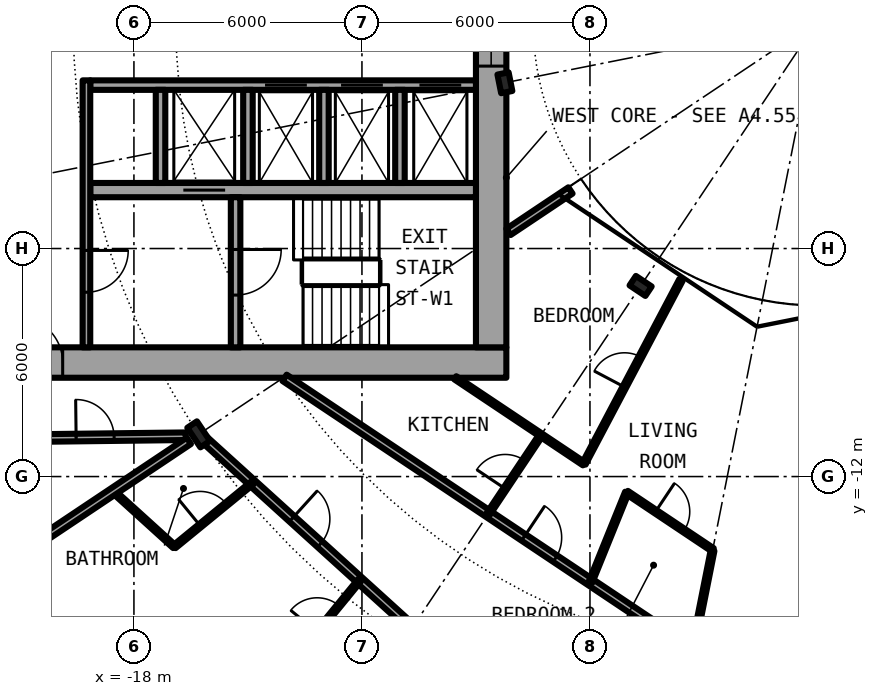
"""IFC4 building model, lengths in metres.
Left out: names, types, materials, properties, quantities, classifications, styles, units other than length and angle.
Written with IfcOpenShell. Run it as: python <this file> out.ifc"""

import sys

from ifc_helpers import new_model, si_unit, direction, frame, frame_2d, origin, origin_2d, place, context, subcontext, project, spatial, rectangle, i_section, extrude, element, fill, save


model = new_model("IFC4")
c1 = context("Model", 3, precision=1e-05, world=origin(), true_north=direction((0.0, 1.0)))
c2 = subcontext(c1, "Body", "Model", "MODEL_VIEW")
j1 = project(units=[si_unit("LENGTHUNIT", "METRE"), si_unit("PLANEANGLEUNIT", "RADIAN")], contexts=[c1])
p1 = place(None, origin())
s1 = spatial("IfcSite", under=j1, at=p1, CompositionType="ELEMENT")
p2 = place(p1, origin())
s2 = spatial("IfcBuilding", under=s1, at=p2, CompositionType="ELEMENT")
p3 = place(p2, frame((0.0, 0.0, 31.95)))
s3 = spatial("IfcBuildingStorey", under=s2, at=p3, CompositionType="ELEMENT", Elevation=31.95)
p4 = place(p3, frame((-16.297, -10.889, 0.0), z_axis=(0.0, 0.0, 1.0), x_axis=(-0.831469612303, -0.55557023302, 0.0)))
e1 = element("IfcColumn", 1, at=p4, inside=s3, PredefinedType="COLUMN", context=c2, shape_type="SweptSolid", body=[
    extrude(i_section(OverallWidth=0.305, OverallDepth=0.62, WebThickness=0.021, FlangeThickness=0.04, FilletRadius=0.027, at=origin_2d()), origin(), (0.0, 0.0, 1.0), 3.05),
])
for number, where, z_axis, x_axis in (
    (2, (-8.239, -1.639, 0.0), (0.0, 0.0, 1.0), (-0.981, -0.195, 0.0)),
    (3, (-4.667, -6.984, 0.0), (0.0, 0.0, 1.0), (-0.556, -0.831, 0.0)),
):
    element("IfcColumn", number, at=place(p3, frame(where, z_axis=z_axis, x_axis=x_axis)), inside=s3, PredefinedType="COLUMN", context=c2, shape_type="SweptSolid", body=[
        extrude(i_section(OverallWidth=0.3, OverallDepth=0.5, WebThickness=0.014, FlangeThickness=0.028, FilletRadius=0.027, at=origin_2d()), origin(), (0.0, 0.0, 1.0), 3.05),
    ])
p5 = place(p3, frame((-22.699, -15.167, 0.0), z_axis=(0.0, 0.0, 1.0), x_axis=(0.634382322723, -0.773019449054, 0.0)))
e4 = element("IfcWall", 4, at=p5, inside=s3, PredefinedType="SOLIDWALL", context=c2, shape_type="SweptSolid", body=[
    extrude(rectangle(XDim=5.352, YDim=0.25, at=frame_2d((2.676, 0.0))), origin(), (0.0, 0.0, 1.0), 2.7),
])
p6 = place(p5, frame((0.841, 0.0, 0.0)))
e5 = element("IfcOpeningElement", 5, at=p6, cuts=e4, PredefinedType="OPENING", context=c2, shape_type="SweptSolid", body=[
    extrude(rectangle(XDim=1.0, YDim=2.2, at=frame_2d((0.5, 1.1))), frame((0.0, 0.135, 0.0), z_axis=(0.0, -1.0, 0.0), x_axis=(1.0, 0.0, 0.0)), (0.0, 0.0, 1.0), 0.27),
])
p7 = place(p5, frame((3.111, 0.0, 0.3)))
e6 = element("IfcOpeningElement", 6, at=p7, cuts=e4, PredefinedType="OPENING", context=c2, shape_type="SweptSolid", body=[
    extrude(rectangle(XDim=1.8, YDim=2.1, at=frame_2d((0.9, 1.05))), frame((0.0, 0.135, 0.0), z_axis=(0.0, -1.0, 0.0), x_axis=(1.0, 0.0, 0.0)), (0.0, 0.0, 1.0), 0.27),
])
p8 = place(p3, frame((-22.4, -9.0, 0.0), z_axis=(0.0, 0.0, 1.0), x_axis=(1.0, 0.0, 0.0)))
e7 = element("IfcWall", 7, at=p8, inside=s3, PredefinedType="SHEAR", context=c2, shape_type="SweptSolid", body=[
    extrude(rectangle(XDim=14.2, YDim=0.8, at=frame_2d((7.1, 0.0))), origin(), (0.0, 0.0, 1.0), 3.05),
])
p9 = place(p8, frame((1.325, 0.0, 0.0)))
e8 = element("IfcOpeningElement", 8, at=p9, cuts=e7, PredefinedType="OPENING", context=c2, shape_type="SweptSolid", body=[
    extrude(rectangle(XDim=1.2, YDim=2.3, at=frame_2d((0.6, 1.15))), frame((0.0, 0.41, 0.0), z_axis=(0.0, -1.0, 0.0), x_axis=(1.0, 0.0, 0.0)), (0.0, 0.0, 1.0), 0.82),
])
p10 = place(p3, frame((-8.6, 8.6, 0.0), z_axis=(0.0, 0.0, 1.0), x_axis=(0.0, -1.0, 0.0)))
e9 = element("IfcWall", 9, at=p10, inside=s3, PredefinedType="SHEAR", context=c2, shape_type="SweptSolid", body=[
    extrude(rectangle(XDim=17.2, YDim=0.8, at=frame_2d((8.6, 0.0))), origin(), (0.0, 0.0, 1.0), 3.05),
])
p11 = place(p10, frame((7.4, 0.0, 0.1)))
e10 = element("IfcOpeningElement", 10, at=p11, cuts=e9, PredefinedType="OPENING", context=c2, shape_type="SweptSolid", body=[
    extrude(rectangle(XDim=2.4, YDim=2.2, at=frame_2d((1.2, 1.1))), frame((0.0, 0.41, 0.0), z_axis=(0.0, -1.0, 0.0), x_axis=(1.0, 0.0, 0.0)), (0.0, 0.0, 1.0), 0.82),
])
p12 = place(p3, frame((-9.0, -1.7, 0.0), z_axis=(0.0, 0.0, 1.0), x_axis=(-1.0, 0.0, 0.0)))
e11 = element("IfcWall", 11, at=p12, inside=s3, PredefinedType="SHEAR", context=c2, shape_type="SweptSolid", body=[
    extrude(rectangle(XDim=10.15, YDim=0.25, at=frame_2d((5.075, 0.0))), origin(), (0.0, 0.0, 1.0), 3.05),
])
p13 = place(p12, frame((0.387, 0.0, 0.0)))
e12 = element("IfcOpeningElement", 12, at=p13, cuts=e11, PredefinedType="OPENING", context=c2, shape_type="SweptSolid", body=[
    extrude(rectangle(XDim=1.1, YDim=2.3, at=frame_2d((0.55, 1.15))), frame((0.0, 0.135, 0.0), z_axis=(0.0, -1.0, 0.0), x_axis=(1.0, 0.0, 0.0)), (0.0, 0.0, 1.0), 0.27),
])
p14 = place(p12, frame((2.45, 0.0, 0.0)))
e13 = element("IfcOpeningElement", 13, at=p14, cuts=e11, PredefinedType="OPENING", context=c2, shape_type="SweptSolid", body=[
    extrude(rectangle(XDim=1.1, YDim=2.3, at=frame_2d((0.55, 1.15))), frame((0.0, 0.135, 0.0), z_axis=(0.0, -1.0, 0.0), x_axis=(1.0, 0.0, 0.0)), (0.0, 0.0, 1.0), 0.27),
])
p15 = place(p12, frame((4.45, 0.0, 0.0)))
e14 = element("IfcOpeningElement", 14, at=p15, cuts=e11, PredefinedType="OPENING", context=c2, shape_type="SweptSolid", body=[
    extrude(rectangle(XDim=1.1, YDim=2.3, at=frame_2d((0.55, 1.15))), frame((0.0, 0.135, 0.0), z_axis=(0.0, -1.0, 0.0), x_axis=(1.0, 0.0, 0.0)), (0.0, 0.0, 1.0), 0.27),
])
p16 = place(p3, frame((-9.0, -4.462, 0.0), z_axis=(0.0, 0.0, 1.0), x_axis=(-1.0, 0.0, 0.0)))
e15 = element("IfcWall", 15, at=p16, inside=s3, PredefinedType="SHEAR", context=c2, shape_type="SweptSolid", body=[
    extrude(rectangle(XDim=10.15, YDim=0.375, at=frame_2d((5.075, 0.0))), origin(), (0.0, 0.0, 1.0), 3.05),
])
p17 = place(p16, frame((6.6, 0.0, 0.0)))
e16 = element("IfcOpeningElement", 16, at=p17, cuts=e15, PredefinedType="OPENING", context=c2, shape_type="SweptSolid", body=[
    extrude(rectangle(XDim=1.1, YDim=2.3, at=frame_2d((0.55, 1.15))), frame((0.0, 0.198, 0.0), z_axis=(0.0, -1.0, 0.0), x_axis=(1.0, 0.0, 0.0)), (0.0, 0.0, 1.0), 0.395),
])
p18 = place(p3, frame((-15.325, -4.65, 0.0), z_axis=(0.0, 0.0, 1.0), x_axis=(0.0, -1.0, 0.0)))
e17 = element("IfcWall", 17, at=p18, inside=s3, PredefinedType="SHEAR", context=c2, shape_type="SweptSolid", body=[
    extrude(rectangle(XDim=3.95, YDim=0.25, at=frame_2d((1.975, 0.0))), origin(), (0.0, 0.0, 1.0), 3.05),
])
p19 = place(p18, frame((1.375, 0.0, 0.0)))
e18 = element("IfcOpeningElement", 18, at=p19, cuts=e17, PredefinedType="OPENING", context=c2, shape_type="SweptSolid", body=[
    extrude(rectangle(XDim=1.2, YDim=2.3, at=frame_2d((0.6, 1.15))), frame((0.0, 0.135, 0.0), z_axis=(0.0, -1.0, 0.0), x_axis=(1.0, 0.0, 0.0)), (0.0, 0.0, 1.0), 0.27),
])
for number, where, z_axis, x_axis in (
    (19, (-15.0, -1.825, 0.0), (0.0, 0.0, 1.0), (0.0, -1.0, 0.0)),
    (20, (-17.3, -1.825, 0.0), (0.0, 0.0, 1.0), (0.0, -1.0, 0.0)),
):
    element("IfcWall", number, at=place(p3, frame(where, z_axis=z_axis, x_axis=x_axis)), inside=s3, PredefinedType="SOLIDWALL", context=c2, shape_type="SweptSolid", body=[
        extrude(rectangle(XDim=2.45, YDim=0.25, at=frame_2d((1.225, 0.0))), origin(), (0.0, 0.0, 1.0), 2.7),
    ])
p20 = place(p3, frame((-19.25, -1.575, 0.0), z_axis=(0.0, 0.0, 1.0), x_axis=(0.0, -1.0, 0.0)))
e21 = element("IfcWall", 21, at=p20, inside=s3, PredefinedType="SOLIDWALL", context=c2, shape_type="SweptSolid", body=[
    extrude(rectangle(XDim=7.025, YDim=0.2, at=frame_2d((3.513, 0.0))), origin(), (0.0, 0.0, 1.0), 2.7),
])
p21 = place(p20, frame((4.475, 0.0, 0.0)))
e22 = element("IfcOpeningElement", 22, at=p21, cuts=e21, PredefinedType="OPENING", context=c2, shape_type="SweptSolid", body=[
    extrude(rectangle(XDim=1.1, YDim=2.3, at=frame_2d((0.55, 1.15))), frame((0.0, 0.11, 0.0), z_axis=(0.0, -1.0, 0.0), x_axis=(1.0, 0.0, 0.0)), (0.0, 0.0, 1.0), 0.22),
])
for number, where, z_axis, x_axis in (
    (23, (-11.0, -1.825, 0.0), (0.0, 0.0, 1.0), (0.0, -1.0, 0.0)),
    (24, (-13.0, -1.825, 0.0), (0.0, 0.0, 1.0), (0.0, -1.0, 0.0)),
):
    element("IfcWall", number, at=place(p3, frame(where, z_axis=z_axis, x_axis=x_axis)), inside=s3, PredefinedType="SOLIDWALL", context=c2, shape_type="SweptSolid", body=[
        extrude(rectangle(XDim=2.45, YDim=0.25, at=frame_2d((1.225, 0.0))), origin(), (0.0, 0.0, 1.0), 2.7),
    ])
p22 = place(p3, frame((-18.542, -12.389, 0.0), z_axis=(0.0, 0.0, 1.0), x_axis=(0.740836325503, -0.671685595212, 0.0)))
e25 = element("IfcWall", 25, at=p22, inside=s3, PredefinedType="PARTITIONING", context=c2, shape_type="SweptSolid", body=[
    extrude(rectangle(XDim=2.168, YDim=0.1, at=frame_2d((1.084, 0.0))), origin(), (0.0, 0.0, 1.0), 2.7),
])
p23 = place(p3, frame((-16.18, -10.994, 0.0), z_axis=(0.0, 0.0, 1.0), x_axis=(0.74089212117, -0.671624050186, 0.0)))
e26 = element("IfcWall", 26, at=p23, inside=s3, PredefinedType="PARTITIONING", context=c2, shape_type="SweptSolid", body=[
    extrude(rectangle(XDim=9.368, YDim=0.2, at=frame_2d((4.684, 0.0))), origin(), (0.0, 0.0, 1.0), 2.38),
])
p24 = place(p23, frame((3.153, 0.0, 0.0)))
e27 = element("IfcOpeningElement", 27, at=p24, cuts=e26, PredefinedType="OPENING", context=c2, shape_type="SweptSolid", body=[
    extrude(rectangle(XDim=1.0, YDim=2.3, at=frame_2d((0.5, 1.15))), frame((0.0, 0.11, 0.0), z_axis=(0.0, -1.0, 0.0), x_axis=(1.0, 0.0, 0.0)), (0.0, 0.0, 1.0), 0.22),
])
p25 = place(p3, frame((-14.036, -9.402, 0.0), z_axis=(0.0, 0.0, 1.0), x_axis=(0.831561346449, -0.555432918625, 0.0)))
e28 = element("IfcWall", 28, at=p25, inside=s3, PredefinedType="PARTITIONING", context=c2, shape_type="SweptSolid", body=[
    extrude(rectangle(XDim=12.914, YDim=0.2, at=frame_2d((6.457, 0.0))), origin(), (0.0, 0.0, 1.0), 2.7),
])
p26 = place(p25, frame((7.566, 0.0, 0.0)))
e29 = element("IfcOpeningElement", 29, at=p26, cuts=e28, PredefinedType="OPENING", context=c2, shape_type="SweptSolid", body=[
    extrude(rectangle(XDim=1.0, YDim=2.3, at=frame_2d((0.5, 1.15))), frame((0.0, 0.11, 0.0), z_axis=(0.0, -1.0, 0.0), x_axis=(1.0, 0.0, 0.0)), (0.0, 0.0, 1.0), 0.22),
])
p27 = place(p3, frame((-9.545, -9.401, 0.0), z_axis=(0.0, 0.0, 1.0), x_axis=(0.831459707426, -0.555585056429, 0.0)))
e30 = element("IfcWall", 30, at=p27, inside=s3, PredefinedType="PARTITIONING", context=c2, shape_type="SweptSolid", body=[
    extrude(rectangle(XDim=4.073, YDim=0.1, at=frame_2d((2.037, 0.0))), origin(), (0.0, 0.0, 1.0), 2.7),
])
p28 = place(p3, frame((-5.029, -12.418, 0.0), z_axis=(0.0, 0.0, 1.0), x_axis=(0.831538390496, -0.555467285384, 0.0)))
e31 = element("IfcWall", 31, at=p28, inside=s3, PredefinedType="PARTITIONING", context=c2, shape_type="SweptSolid", body=[
    extrude(rectangle(XDim=2.717, YDim=0.1, at=frame_2d((1.358, 0.0))), origin(), (0.0, 0.0, 1.0), 2.7),
])
p29 = place(p28, frame((0.908, 0.0, 0.0)))
e32 = element("IfcOpeningElement", 32, at=p29, cuts=e31, PredefinedType="OPENING", context=c2, shape_type="SweptSolid", body=[
    extrude(rectangle(XDim=0.9, YDim=2.3, at=frame_2d((0.45, 1.15))), frame((0.0, 0.06, 0.0), z_axis=(0.0, -1.0, 0.0), x_axis=(1.0, 0.0, 0.0)), (0.0, 0.0, 1.0), 0.12),
])
p30 = place(p3, frame((-21.675, -11.0, 0.0), z_axis=(0.0, 0.0, 1.0), x_axis=(0.999926652916, 0.012111514691, 0.0)))
e33 = element("IfcWall", 33, at=p30, inside=s3, PredefinedType="PARTITIONING", context=c2, shape_type="SweptSolid", body=[
    extrude(rectangle(XDim=5.04, YDim=0.2, at=frame_2d((2.52, 0.0))), origin(), (0.0, 0.0, 1.0), 2.7),
])
p31 = place(p30, frame((2.154, 0.0, 0.0)))
e34 = element("IfcOpeningElement", 34, at=p31, cuts=e33, PredefinedType="OPENING", context=c2, shape_type="SweptSolid", body=[
    extrude(rectangle(XDim=1.0, YDim=2.3, at=frame_2d((0.5, 1.15))), frame((0.0, 0.11, 0.0), z_axis=(0.0, -1.0, 0.0), x_axis=(1.0, 0.0, 0.0)), (0.0, 0.0, 1.0), 0.22),
])
p32 = place(p3, frame((-6.513, -4.472, 0.0), z_axis=(0.0, 0.0, 1.0), x_axis=(-0.831417956244, -0.555647533996, 0.0)))
e35 = element("IfcWall", 35, at=p32, inside=s3, PredefinedType="PARTITIONING", context=c2, shape_type="SweptSolid", body=[
    extrude(rectangle(XDim=1.962, YDim=0.2, at=frame_2d((0.981, 0.0))), origin(), (0.0, 0.0, 1.0), 2.7),
])
p33 = place(p3, frame((-22.595, -15.097, 0.0), z_axis=(0.0, 0.0, 1.0), x_axis=(0.831465568067, 0.555576285599, 0.0)))
e36 = element("IfcWall", 36, at=p33, inside=s3, PredefinedType="PARTITIONING", context=c2, shape_type="SweptSolid", body=[
    extrude(rectangle(XDim=7.264, YDim=0.2, at=frame_2d((3.632, 0.0))), origin(), (0.0, 0.0, 1.0), 2.7),
])
p34 = place(p3, frame((-17.219, -21.023, 0.0), z_axis=(0.0, 0.0, 1.0), x_axis=(0.633664062855, 0.773608334654, 0.0)))
e37 = element("IfcWall", 37, at=p34, inside=s3, PredefinedType="PARTITIONING", context=c2, shape_type="SweptSolid", body=[
    extrude(rectangle(XDim=8.138, YDim=0.1, at=frame_2d((4.069, 0.0))), origin(), (0.0, 0.0, 1.0), 2.7),
])
p35 = place(p34, frame((6.377, 0.0, 0.0)))
e38 = element("IfcOpeningElement", 38, at=p35, cuts=e37, PredefinedType="OPENING", context=c2, shape_type="SweptSolid", body=[
    extrude(rectangle(XDim=0.9, YDim=2.3, at=frame_2d((0.45, 1.15))), frame((0.0, 0.06, 0.0), z_axis=(0.0, -1.0, 0.0), x_axis=(1.0, 0.0, 0.0)), (0.0, 0.0, 1.0), 0.12),
])
p36 = place(p34, frame((2.308, 0.0, 0.0)))
e39 = element("IfcOpeningElement", 39, at=p36, cuts=e37, PredefinedType="OPENING", context=c2, shape_type="SweptSolid", body=[
    extrude(rectangle(XDim=0.9, YDim=2.3, at=frame_2d((0.45, 1.15))), frame((0.0, 0.06, 0.0), z_axis=(0.0, -1.0, 0.0), x_axis=(1.0, 0.0, 0.0)), (0.0, 0.0, 1.0), 0.12),
])
p37 = place(p3, frame((-16.936, -13.845, 0.0), z_axis=(0.0, 0.0, 1.0), x_axis=(0.774162545943, 0.632986850147, 0.0)))
e40 = element("IfcWall", 40, at=p37, inside=s3, PredefinedType="PARTITIONING", context=c2, shape_type="SweptSolid", body=[
    extrude(rectangle(XDim=2.649, YDim=0.1, at=frame_2d((1.325, 0.0))), origin(), (0.0, 0.0, 1.0), 2.7),
])
p38 = place(p37, frame((0.875, 0.0, 0.0)))
e41 = element("IfcOpeningElement", 41, at=p38, cuts=e40, PredefinedType="OPENING", context=c2, shape_type="SweptSolid", body=[
    extrude(rectangle(XDim=0.9, YDim=2.3, at=frame_2d((0.45, 1.15))), frame((0.0, 0.06, 0.0), z_axis=(0.0, -1.0, 0.0), x_axis=(1.0, 0.0, 0.0)), (0.0, 0.0, 1.0), 0.12),
])
p39 = place(p3, frame((-8.675, -12.982, 0.0), z_axis=(0.0, 0.0, 1.0), x_axis=(0.555625883274, 0.831432425297, 0.0)))
e42 = element("IfcWall", 42, at=p39, inside=s3, PredefinedType="PARTITIONING", context=c2, shape_type="SweptSolid", body=[
    extrude(rectangle(XDim=2.494, YDim=0.1, at=frame_2d((1.247, 0.0))), origin(), (0.0, 0.0, 1.0), 2.7),
])
p40 = place(p39, frame((0.798, 0.0, 0.0)))
e43 = element("IfcOpeningElement", 43, at=p40, cuts=e42, PredefinedType="OPENING", context=c2, shape_type="SweptSolid", body=[
    extrude(rectangle(XDim=0.9, YDim=2.3, at=frame_2d((0.45, 1.15))), frame((0.0, 0.06, 0.0), z_axis=(0.0, -1.0, 0.0), x_axis=(1.0, 0.0, 0.0)), (0.0, 0.0, 1.0), 0.12),
])
p41 = place(p3, frame((-6.159, -11.663, 0.0), z_axis=(0.0, 0.0, 1.0), x_axis=(0.466976820365, 0.884269556889, 0.0)))
e44 = element("IfcWall", 44, at=p41, inside=s3, PredefinedType="PARTITIONING", context=c2, shape_type="SweptSolid", body=[
    extrude(rectangle(XDim=5.469, YDim=0.1, at=frame_2d((2.735, 0.0))), origin(), (0.0, 0.0, 1.0), 2.7),
])
p42 = place(p41, frame((2.284, 0.0, 0.0)))
e45 = element("IfcOpeningElement", 45, at=p42, cuts=e44, PredefinedType="OPENING", context=c2, shape_type="SweptSolid", body=[
    extrude(rectangle(XDim=0.9, YDim=2.3, at=frame_2d((0.45, 1.15))), frame((0.0, 0.06, 0.0), z_axis=(0.0, -1.0, 0.0), x_axis=(1.0, 0.0, 0.0)), (0.0, 0.0, 1.0), 0.12),
])
p43 = place(p3, frame((-5.986, -14.779, 0.0), z_axis=(0.0, 0.0, 1.0), x_axis=(0.375649498413, 0.926761811008, 0.0)))
e46 = element("IfcWall", 46, at=p43, inside=s3, PredefinedType="PARTITIONING", context=c2, shape_type="SweptSolid", body=[
    extrude(rectangle(XDim=2.548, YDim=0.1, at=frame_2d((1.274, 0.0))), origin(), (0.0, 0.0, 1.0), 2.7),
])
p44 = place(p3, frame((-2.774, -13.948, 0.0), z_axis=(0.0, 0.0, 1.0), x_axis=(-0.195338620417, -0.980735858105, 0.0)))
e47 = element("IfcWall", 47, at=p44, inside=s3, PredefinedType="PARTITIONING", context=c2, shape_type="SweptSolid", body=[
    extrude(rectangle(XDim=2.657, YDim=0.1, at=frame_2d((1.329, 0.0))), origin(), (0.0, 0.0, 1.0), 2.7),
])
p45 = place(p13, origin())
e48 = element("IfcDoor", 48, at=p45, inside=s3, OperationType="DOUBLE_DOOR_SLIDING", PredefinedType="DOOR", context=c2, shape_type="SweptSolid", body=[
    extrude(rectangle(XDim=1.1, YDim=2.3, at=frame_2d((0.55, 1.15))), frame((0.0, 0.025, 0.0), z_axis=(0.0, -1.0, 0.0), x_axis=(1.0, 0.0, 0.0)), (0.0, 0.0, 1.0), 0.05),
])
fill(e12, e48)
p46 = place(p14, origin())
e49 = element("IfcDoor", 49, at=p46, inside=s3, OperationType="DOUBLE_DOOR_SLIDING", PredefinedType="DOOR", context=c2, shape_type="SweptSolid", body=[
    extrude(rectangle(XDim=1.1, YDim=2.3, at=frame_2d((0.55, 1.15))), frame((0.0, 0.025, 0.0), z_axis=(0.0, -1.0, 0.0), x_axis=(1.0, 0.0, 0.0)), (0.0, 0.0, 1.0), 0.05),
])
fill(e13, e49)
p47 = place(p15, origin())
e50 = element("IfcDoor", 50, at=p47, inside=s3, OperationType="DOUBLE_DOOR_SLIDING", PredefinedType="DOOR", context=c2, shape_type="SweptSolid", body=[
    extrude(rectangle(XDim=1.1, YDim=2.3, at=frame_2d((0.55, 1.15))), frame((0.0, 0.025, 0.0), z_axis=(0.0, -1.0, 0.0), x_axis=(1.0, 0.0, 0.0)), (0.0, 0.0, 1.0), 0.05),
])
fill(e14, e50)
p48 = place(p17, origin())
e51 = element("IfcDoor", 51, at=p48, inside=s3, OperationType="DOUBLE_DOOR_SLIDING", PredefinedType="DOOR", context=c2, shape_type="SweptSolid", body=[
    extrude(rectangle(XDim=1.1, YDim=2.3, at=frame_2d((0.55, 1.15))), frame((0.0, 0.025, 0.0), z_axis=(0.0, -1.0, 0.0), x_axis=(1.0, 0.0, 0.0)), (0.0, 0.0, 1.0), 0.05),
])
fill(e16, e51)
p49 = place(p19, origin())
e52 = element("IfcDoor", 52, at=p49, inside=s3, OperationType="SINGLE_SWING_LEFT", PredefinedType="DOOR", context=c2, shape_type="SweptSolid", body=[
    extrude(rectangle(XDim=1.2, YDim=2.3, at=frame_2d((0.6, 1.15))), frame((0.0, 0.025, 0.0), z_axis=(0.0, -1.0, 0.0), x_axis=(1.0, 0.0, 0.0)), (0.0, 0.0, 1.0), 0.05),
])
fill(e18, e52)
p50 = place(p21, origin())
e53 = element("IfcDoor", 53, at=p50, inside=s3, OperationType="SINGLE_SWING_LEFT", PredefinedType="DOOR", context=c2, shape_type="SweptSolid", body=[
    extrude(rectangle(XDim=1.1, YDim=2.3, at=frame_2d((0.55, 1.15))), frame((0.0, 0.025, 0.0), z_axis=(0.0, -1.0, 0.0), x_axis=(1.0, 0.0, 0.0)), (0.0, 0.0, 1.0), 0.05),
])
fill(e22, e53)
p51 = place(p9, origin())
e54 = element("IfcDoor", 54, at=p51, inside=s3, OperationType="SINGLE_SWING_RIGHT", PredefinedType="DOOR", context=c2, shape_type="SweptSolid", body=[
    extrude(rectangle(XDim=1.2, YDim=2.3, at=frame_2d((0.6, 1.15))), frame((0.0, 0.025, 0.0), z_axis=(0.0, -1.0, 0.0), x_axis=(1.0, 0.0, 0.0)), (0.0, 0.0, 1.0), 0.05),
])
fill(e8, e54)
p52 = place(p11, origin())
e55 = element("IfcWindow", 55, at=p52, inside=s3, PartitioningType="SINGLE_PANEL", PredefinedType="WINDOW", context=c2, shape_type="SweptSolid", body=[
    extrude(rectangle(XDim=2.4, YDim=2.2, at=frame_2d((1.2, 1.1))), frame((0.0, 0.03, 0.0), z_axis=(0.0, -1.0, 0.0), x_axis=(1.0, 0.0, 0.0)), (0.0, 0.0, 1.0), 0.06),
])
fill(e10, e55)
p53 = place(p24, origin())
e56 = element("IfcDoor", 56, at=p53, inside=s3, OperationType="SINGLE_SWING_LEFT", PredefinedType="DOOR", context=c2, shape_type="SweptSolid", body=[
    extrude(rectangle(XDim=1.0, YDim=2.3, at=frame_2d((0.5, 1.15))), frame((0.0, 0.025, 0.0), z_axis=(0.0, -1.0, 0.0), x_axis=(1.0, 0.0, 0.0)), (0.0, 0.0, 1.0), 0.05),
])
fill(e27, e56)
p54 = place(p38, origin())
e57 = element("IfcDoor", 57, at=p54, inside=s3, OperationType="SINGLE_SWING_LEFT", PredefinedType="DOOR", context=c2, shape_type="SweptSolid", body=[
    extrude(rectangle(XDim=0.9, YDim=2.3, at=frame_2d((0.45, 1.15))), frame((0.0, 0.025, 0.0), z_axis=(0.0, -1.0, 0.0), x_axis=(1.0, 0.0, 0.0)), (0.0, 0.0, 1.0), 0.05),
])
fill(e41, e57)
p55 = place(p35, origin())
e58 = element("IfcDoor", 58, at=p55, inside=s3, OperationType="SINGLE_SWING_RIGHT", PredefinedType="DOOR", context=c2, shape_type="SweptSolid", body=[
    extrude(rectangle(XDim=0.9, YDim=2.3, at=frame_2d((0.45, 1.15))), frame((0.0, 0.025, 0.0), z_axis=(0.0, -1.0, 0.0), x_axis=(1.0, 0.0, 0.0)), (0.0, 0.0, 1.0), 0.05),
])
fill(e38, e58)
p56 = place(p26, origin())
e59 = element("IfcDoor", 59, at=p56, inside=s3, OperationType="SINGLE_SWING_RIGHT", PredefinedType="DOOR", context=c2, shape_type="SweptSolid", body=[
    extrude(rectangle(XDim=1.0, YDim=2.3, at=frame_2d((0.5, 1.15))), frame((0.0, 0.025, 0.0), z_axis=(0.0, -1.0, 0.0), x_axis=(1.0, 0.0, 0.0)), (0.0, 0.0, 1.0), 0.05),
])
fill(e29, e59)
p57 = place(p29, origin())
e60 = element("IfcDoor", 60, at=p57, inside=s3, OperationType="SINGLE_SWING_LEFT", PredefinedType="DOOR", context=c2, shape_type="SweptSolid", body=[
    extrude(rectangle(XDim=0.9, YDim=2.3, at=frame_2d((0.45, 1.15))), frame((0.0, 0.025, 0.0), z_axis=(0.0, -1.0, 0.0), x_axis=(1.0, 0.0, 0.0)), (0.0, 0.0, 1.0), 0.05),
])
fill(e32, e60)
p58 = place(p40, origin())
e61 = element("IfcDoor", 61, at=p58, inside=s3, OperationType="SINGLE_SWING_RIGHT", PredefinedType="DOOR", context=c2, shape_type="SweptSolid", body=[
    extrude(rectangle(XDim=0.9, YDim=2.3, at=frame_2d((0.45, 1.15))), frame((0.0, 0.025, 0.0), z_axis=(0.0, -1.0, 0.0), x_axis=(1.0, 0.0, 0.0)), (0.0, 0.0, 1.0), 0.05),
])
fill(e43, e61)
p59 = place(p42, origin())
e62 = element("IfcDoor", 62, at=p59, inside=s3, OperationType="SINGLE_SWING_LEFT", PredefinedType="DOOR", context=c2, shape_type="SweptSolid", body=[
    extrude(rectangle(XDim=0.9, YDim=2.3, at=frame_2d((0.45, 1.15))), frame((0.0, 0.025, 0.0), z_axis=(0.0, -1.0, 0.0), x_axis=(1.0, 0.0, 0.0)), (0.0, 0.0, 1.0), 0.05),
])
fill(e45, e62)
p60 = place(p31, origin())
e63 = element("IfcDoor", 63, at=p60, inside=s3, OperationType="SINGLE_SWING_RIGHT", PredefinedType="DOOR", context=c2, shape_type="SweptSolid", body=[
    extrude(rectangle(XDim=1.0, YDim=2.3, at=frame_2d((0.5, 1.15))), frame((0.0, 0.025, 0.0), z_axis=(0.0, -1.0, 0.0), x_axis=(1.0, 0.0, 0.0)), (0.0, 0.0, 1.0), 0.05),
])
fill(e34, e63)
save(model, sys.argv[1])
